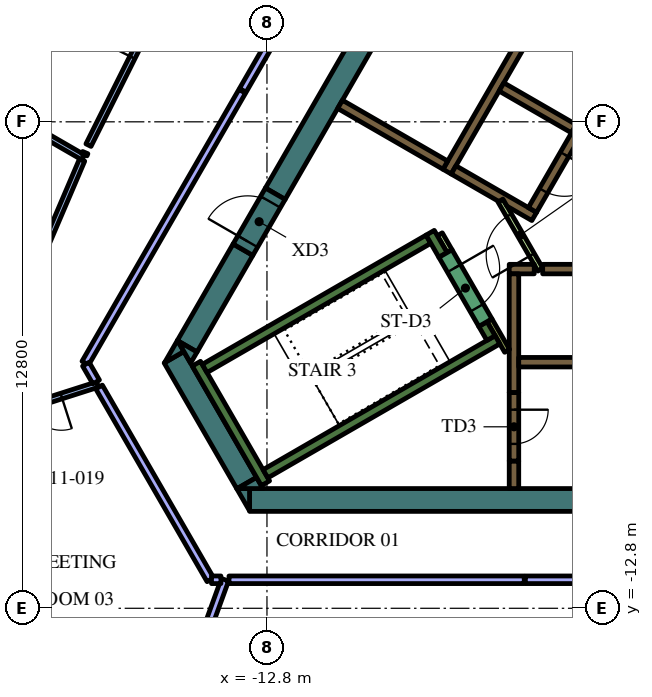
"""IFC4 building model, lengths in metres.
Left out: names, types, materials, properties, quantities, classifications, styles, units other than length and angle.
Written with IfcOpenShell. Run it as: python <this file> out.ifc"""

import sys

from ifc_helpers import new_model, si_unit, direction, frame, frame_2d, origin, place, context, subcontext, project, spatial, polyline, rectangle, outline, extrude, element, fill, save


model = new_model("IFC4")
c1 = context("Model", 3, precision=1e-05, world=origin(), true_north=direction((0.0, 1.0)))
c2 = subcontext(c1, "Body", "Model", "MODEL_VIEW")
j1 = project(units=[si_unit("LENGTHUNIT", "METRE"), si_unit("PLANEANGLEUNIT", "RADIAN")], contexts=[c1])
p1 = place(None, origin())
s1 = spatial("IfcSite", under=j1, at=p1, CompositionType="ELEMENT")
p2 = place(p1, origin())
s2 = spatial("IfcBuilding", under=s1, at=p2, CompositionType="ELEMENT")
p3 = place(p2, frame((0.0, 0.0, 267.0)))
s3 = spatial("IfcBuildingStorey", under=s2, at=p3, CompositionType="ELEMENT", Elevation=267.0)
p4 = place(p3, frame((8.904, -9.95, 0.0), z_axis=(0.0, 0.0, 1.0), x_axis=(-1.0, 0.0, 0.0)))
e1 = element("IfcWall", 1, at=p4, inside=s3, PredefinedType="SOLIDWALL", context=c2, shape_type="SweptSolid", body=[
    extrude(rectangle(XDim=22.161, YDim=0.6, at=frame_2d((11.081, 0.0))), origin(), (0.0, 0.0, 1.0), 4.2),
])
p5 = place(p3, origin())
e2 = element("IfcWall", 2, at=p5, inside=s3, PredefinedType="SOLIDWALL", context=c2, shape_type="SweptSolid", body=[
    extrude(outline(polyline([(-13.597, -9.65), (-13.259, -9.65), (-13.259, -10.236), (-13.597, -9.65)])), origin(), (0.0, 0.0, 1.0), 4.2),
])
p6 = place(p3, frame((-13.333, -9.506, 0.0), z_axis=(0.0, 0.0, 1.0), x_axis=(-0.500019073792, 0.866014391245, 0.0)))
e3 = element("IfcWall", 3, at=p6, inside=s3, PredefinedType="SOLIDWALL", context=c2, shape_type="SweptSolid", body=[
    extrude(rectangle(XDim=3.823, YDim=0.6, at=frame_2d((1.912, 0.0))), origin(), (0.0, 0.0, 1.0), 4.2),
])
e4 = element("IfcWall", 4, at=p5, inside=s3, PredefinedType="SOLIDWALL", context=c2, shape_type="SweptSolid", body=[
    extrude(outline(polyline([(-14.987, -6.043), (-15.493, -6.335), (-15.156, -5.75), (-14.987, -6.043)])), origin(), (0.0, 0.0, 1.0), 4.2),
])
e5 = element("IfcWall", 5, at=p5, inside=s3, PredefinedType="SOLIDWALL", context=c2, shape_type="SweptSolid", body=[
    extrude(outline(polyline([(-12.904, -9.65), (-13.58, -9.65), (-13.073, -9.357), (-12.904, -9.65)])), origin(), (0.0, 0.0, 1.0), 4.2),
])
p7 = place(p3, frame((-13.432, -3.364, 0.0), z_axis=(0.0, 0.0, 1.0), x_axis=(-0.499960127962, -0.866048422692, 0.0)))
e6 = element("IfcWall", 6, at=p7, inside=s3, PredefinedType="SOLIDWALL", context=c2, shape_type="SweptSolid", body=[
    extrude(rectangle(XDim=2.934, YDim=0.6, at=frame_2d((1.467, 0.0))), origin(), (0.0, 0.0, 1.0), 4.2),
])
e7 = element("IfcWall", 7, at=p5, inside=s3, PredefinedType="SOLIDWALL", context=c2, shape_type="SweptSolid", body=[
    extrude(outline(polyline([(-14.809, -6.35), (-15.147, -5.764), (-14.64, -6.057), (-14.809, -6.35)])), origin(), (0.0, 0.0, 1.0), 4.2),
])
p8 = place(p3, frame((-4.652, 11.842, 0.0), z_axis=(0.0, 0.0, 1.0), x_axis=(-0.500003640647, -0.866023301845, 0.0)))
e8 = element("IfcWall", 8, at=p8, inside=s3, PredefinedType="SOLIDWALL", context=c2, shape_type="SweptSolid", body=[
    extrude(rectangle(XDim=15.858, YDim=0.6, at=frame_2d((7.929, 0.0))), origin(), (0.0, 0.0, 1.0), 4.2),
])
p9 = place(p3, frame((-12.84, -9.511, 0.0), z_axis=(0.0, 0.0, 1.0), x_axis=(-0.499997733992, 0.866026712061, 0.0)))
e9 = element("IfcWall", 9, at=p9, inside=s3, PredefinedType="SOLIDWALL", context=c2, shape_type="SweptSolid", body=[
    extrude(rectangle(XDim=3.634, YDim=0.25, at=frame_2d((1.817, 0.0))), origin(), (0.0, 0.0, 1.0), 4.2),
])
p10 = place(p3, frame((-14.44, -6.49, 0.0), z_axis=(0.0, 0.0, 1.0), x_axis=(0.866022966069, 0.500004222222, 0.0)))
e10 = element("IfcWall", 10, at=p10, inside=s3, PredefinedType="SOLIDWALL", context=c2, shape_type="SweptSolid", body=[
    extrude(rectangle(XDim=6.8, YDim=0.25, at=frame_2d((3.4, 0.0))), origin(), (0.0, 0.0, 1.0), 4.2),
])
p11 = place(p3, frame((-8.168, -3.503, 0.0), z_axis=(0.0, 0.0, 1.0), x_axis=(-0.499952099219, 0.866053057547, 0.0)))
e11 = element("IfcWall", 11, at=p11, inside=s3, PredefinedType="SOLIDWALL", context=c2, shape_type="SweptSolid", body=[
    extrude(rectangle(XDim=0.675, YDim=0.25, at=frame_2d((0.337, 0.0))), origin(), (0.0, 0.0, 1.0), 4.2),
])
p12 = place(p3, frame((-12.84, -9.261, 0.0), z_axis=(0.0, 0.0, 1.0), x_axis=(0.866016039709, 0.500016218704, 0.0)))
e12 = element("IfcWall", 12, at=p12, inside=s3, PredefinedType="SOLIDWALL", context=c2, shape_type="SweptSolid", body=[
    extrude(rectangle(XDim=7.05, YDim=0.25, at=frame_2d((3.525, 0.0))), origin(), (0.0, 0.0, 1.0), 4.2),
])
p13 = place(p3, frame((-6.905, -5.69, 0.0), z_axis=(0.0, 0.0, 1.0), x_axis=(-0.500402024738, 0.865793170242, 0.0)))
e13 = element("IfcWall", 13, at=p13, inside=s3, PredefinedType="SOLIDWALL", context=c2, shape_type="SweptSolid", body=[
    extrude(rectangle(XDim=0.425, YDim=0.25, at=frame_2d((0.212, 0.0))), origin(), (0.0, 0.0, 1.0), 4.2),
])
p14 = place(p3, frame((-5.545, -3.875, 0.0), z_axis=(0.0, 0.0, 1.0), x_axis=(1.0, 0.0, 0.0)))
e14 = element("IfcWall", 14, at=p14, inside=s3, PredefinedType="SOLIDWALL", context=c2, shape_type="SweptSolid", body=[
    extrude(rectangle(XDim=11.97, YDim=0.25, at=frame_2d((5.985, 0.0))), origin(), (0.0, 0.0, 1.0), 4.2),
])
p15 = place(p3, frame((-6.425, -3.875, 0.0), z_axis=(0.0, 0.0, 1.0), x_axis=(1.0, 0.0, 0.0)))
e15 = element("IfcWall", 15, at=p15, inside=s3, PredefinedType="SOLIDWALL", context=c2, shape_type="SweptSolid", body=[
    extrude(rectangle(XDim=0.658, YDim=0.25, at=frame_2d((0.329, 0.0))), origin(), (0.0, 0.0, 1.0), 4.2),
])
p16 = place(p3, frame((-6.3, -7.125, 0.0), z_axis=(0.0, 0.0, 1.0), x_axis=(0.0, 1.0, 0.0)))
e16 = element("IfcWall", 16, at=p16, inside=s3, PredefinedType="SOLIDWALL", context=c2, shape_type="SweptSolid", body=[
    extrude(rectangle(XDim=3.125, YDim=0.25, at=frame_2d((1.562, 0.0))), origin(), (0.0, 0.0, 1.0), 4.2),
])
p17 = place(p3, frame((-6.3, -8.925, 0.0), z_axis=(0.0, 0.0, 1.0), x_axis=(0.0, -1.0, 0.0)))
e17 = element("IfcWall", 17, at=p17, inside=s3, PredefinedType="SOLIDWALL", context=c2, shape_type="SweptSolid", body=[
    extrude(rectangle(XDim=0.725, YDim=0.25, at=frame_2d((0.363, 0.0))), origin(), (0.0, 0.0, 1.0), 4.2),
])
p18 = place(p3, frame((-8.06, -1.311, 0.0), z_axis=(0.0, 0.0, 1.0), x_axis=(0.50000273126, 0.866023826885, 0.0)))
e18 = element("IfcWall", 18, at=p18, inside=s3, PredefinedType="SOLIDWALL", context=c2, shape_type="SweptSolid", body=[
    extrude(rectangle(XDim=10.33, YDim=0.25, at=frame_2d((5.165, 0.0))), origin(), (0.0, 0.0, 1.0), 4.2),
])
p19 = place(p3, frame((-4.724, -0.182, 0.0), z_axis=(0.0, 0.0, 1.0), x_axis=(-0.866008176907, 0.50002983664, 0.0)))
e19 = element("IfcWall", 19, at=p19, inside=s3, PredefinedType="SOLIDWALL", context=c2, shape_type="SweptSolid", body=[
    extrude(rectangle(XDim=2.2, YDim=0.25, at=frame_2d((1.1, 0.0))), origin(), (0.0, 0.0, 1.0), 4.2),
])
e20 = element("IfcWall", 20, at=p5, inside=s3, PredefinedType="SOLIDWALL", context=c2, shape_type="SweptSolid", body=[
    extrude(outline(polyline([(-5.922, -2.257), (-5.922, -2.257), (-5.705, -2.382), (-5.83, -2.598), (-6.483, -2.221), (-6.591, -2.033), (-6.591, -2.033), (-6.7, -2.096), (-7.952, -1.373), (-7.827, -1.156), (-5.922, -2.257)])), origin(), (0.0, 0.0, 1.0), 4.2),
])
p20 = place(p3, frame((-8.106, -1.14, 0.0), z_axis=(0.0, 0.0, 1.0), x_axis=(-0.866008981251, 0.500028443584, 0.0)))
e21 = element("IfcWall", 21, at=p20, inside=s3, PredefinedType="SOLIDWALL", context=c2, shape_type="SweptSolid", body=[
    extrude(rectangle(XDim=3.2, YDim=0.25, at=frame_2d((1.6, 0.0))), origin(), (0.0, 0.0, 1.0), 4.2),
])
p21 = place(p3, frame((-8.252, -2.958, 0.0), z_axis=(0.0, 0.0, 1.0), x_axis=(0.500174715838, -0.865924508047, 0.0)))
e22 = element("IfcWall", 22, at=p21, inside=s3, PredefinedType="PARTITIONING", context=c2, shape_type="SweptSolid", body=[
    extrude(rectangle(XDim=0.514, YDim=0.15, at=frame_2d((0.257, 0.0))), origin(), (0.0, 0.0, 1.0), 3.55),
])
p22 = place(p3, frame((-6.48, -6.027, 0.0), z_axis=(0.0, 0.0, 1.0), x_axis=(-0.499927229454, 0.866067413802, 0.0)))
e23 = element("IfcWall", 23, at=p22, inside=s3, PredefinedType="PARTITIONING", context=c2, shape_type="SweptSolid", body=[
    extrude(rectangle(XDim=0.929, YDim=0.15, at=frame_2d((0.464, 0.0))), origin(), (0.0, 0.0, 1.0), 4.2),
])
p23 = place(p3, frame((-6.175, -6.325, 0.0), z_axis=(0.0, 0.0, 1.0), x_axis=(1.0, 0.0, 0.0)))
e24 = element("IfcWall", 24, at=p23, inside=s3, PredefinedType="SOLIDWALL", context=c2, shape_type="SweptSolid", body=[
    extrude(rectangle(XDim=12.35, YDim=0.25, at=frame_2d((6.175, 0.0))), origin(), (0.0, 0.0, 1.0), 4.2),
])
p24 = place(p23, frame((3.205, 0.0, 0.0)))
e25 = element("IfcOpeningElement", 25, at=p24, cuts=e24, PredefinedType="OPENING", context=c2, shape_type="SweptSolid", body=[
    extrude(rectangle(XDim=0.9, YDim=2.1, at=frame_2d((0.45, 1.05))), frame((0.0, 0.135, 0.0), z_axis=(0.0, -1.0, 0.0), x_axis=(1.0, 0.0, 0.0)), (0.0, 0.0, 1.0), 0.27),
])
p25 = place(p23, frame((8.145, 0.0, 0.0)))
e26 = element("IfcOpeningElement", 26, at=p25, cuts=e24, PredefinedType="OPENING", context=c2, shape_type="SweptSolid", body=[
    extrude(rectangle(XDim=1.1, YDim=2.1, at=frame_2d((0.55, 1.05))), frame((0.0, 0.135, 0.0), z_axis=(0.0, -1.0, 0.0), x_axis=(1.0, 0.0, 0.0)), (0.0, 0.0, 1.0), 0.27),
])
p26 = place(p23, frame((10.665, 0.0, 0.0)))
e27 = element("IfcOpeningElement", 27, at=p26, cuts=e24, PredefinedType="OPENING", context=c2, shape_type="SweptSolid", body=[
    extrude(rectangle(XDim=1.1, YDim=2.1, at=frame_2d((0.55, 1.05))), frame((0.0, 0.135, 0.0), z_axis=(0.0, -1.0, 0.0), x_axis=(1.0, 0.0, 0.0)), (0.0, 0.0, 1.0), 0.27),
])
p27 = place(p3, frame((-0.898, 6.194, 0.0), z_axis=(0.0, 0.0, 1.0), x_axis=(-0.499996202215, -0.866027596426, 0.0)))
e28 = element("IfcWall", 28, at=p27, inside=s3, PredefinedType="SOLIDWALL", context=c2, shape_type="SweptSolid", body=[
    extrude(rectangle(XDim=9.83, YDim=0.25, at=frame_2d((4.915, 0.0))), origin(), (0.0, 0.0, 1.0), 4.2),
])
p28 = place(p27, frame((0.585, 0.0, 0.0)))
e29 = element("IfcOpeningElement", 29, at=p28, cuts=e28, PredefinedType="OPENING", context=c2, shape_type="SweptSolid", body=[
    extrude(rectangle(XDim=1.1, YDim=2.1, at=frame_2d((0.55, 1.05))), frame((0.0, 0.135, 0.0), z_axis=(0.0, -1.0, 0.0), x_axis=(1.0, 0.0, 0.0)), (0.0, 0.0, 1.0), 0.27),
])
p29 = place(p27, frame((3.105, 0.0, 0.0)))
e30 = element("IfcOpeningElement", 30, at=p29, cuts=e28, PredefinedType="OPENING", context=c2, shape_type="SweptSolid", body=[
    extrude(rectangle(XDim=1.1, YDim=2.1, at=frame_2d((0.55, 1.05))), frame((0.0, 0.135, 0.0), z_axis=(0.0, -1.0, 0.0), x_axis=(1.0, 0.0, 0.0)), (0.0, 0.0, 1.0), 0.27),
])
p30 = place(p27, frame((5.625, 0.0, 0.0)))
e31 = element("IfcOpeningElement", 31, at=p30, cuts=e28, PredefinedType="OPENING", context=c2, shape_type="SweptSolid", body=[
    extrude(rectangle(XDim=1.1, YDim=2.1, at=frame_2d((0.55, 1.05))), frame((0.0, 0.135, 0.0), z_axis=(0.0, -1.0, 0.0), x_axis=(1.0, 0.0, 0.0)), (0.0, 0.0, 1.0), 0.27),
])
p31 = place(p27, frame((8.145, 0.0, 0.0)))
e32 = element("IfcOpeningElement", 32, at=p31, cuts=e28, PredefinedType="OPENING", context=c2, shape_type="SweptSolid", body=[
    extrude(rectangle(XDim=1.1, YDim=2.1, at=frame_2d((0.55, 1.05))), frame((0.0, 0.135, 0.0), z_axis=(0.0, -1.0, 0.0), x_axis=(1.0, 0.0, 0.0)), (0.0, 0.0, 1.0), 0.27),
])
p32 = place(p3, frame((-8.103, -3.466, 0.0), z_axis=(0.0, 0.0, 1.0), x_axis=(0.500078061341, -0.865980330357, 0.0)))
e33 = element("IfcWall", 33, at=p32, inside=s3, PredefinedType="SOLIDWALL", context=c2, shape_type="SweptSolid", body=[
    extrude(rectangle(XDim=2.1, YDim=0.4, at=frame_2d((1.05, 0.0))), origin(), (0.0, 0.0, 1.0), 4.2),
])
p33 = place(p32, frame((0.45, 0.0, 0.0)))
e34 = element("IfcOpeningElement", 34, at=p33, cuts=e33, PredefinedType="OPENING", context=c2, shape_type="SweptSolid", body=[
    extrude(rectangle(XDim=1.2, YDim=2.1, at=frame_2d((0.6, 1.05))), frame((0.0, 0.21, 0.0), z_axis=(0.0, -1.0, 0.0), x_axis=(1.0, 0.0, 0.0)), (0.0, 0.0, 1.0), 0.42),
])
p34 = place(p3, frame((-6.3, -7.125, 0.0), z_axis=(0.0, 0.0, 1.0), x_axis=(0.0, -1.0, 0.0)))
e35 = element("IfcWall", 35, at=p34, inside=s3, PredefinedType="SOLIDWALL", context=c2, shape_type="SweptSolid", body=[
    extrude(rectangle(XDim=1.8, YDim=0.25, at=frame_2d((0.9, 0.0))), origin(), (0.0, 0.0, 1.0), 4.2),
])
p35 = place(p34, frame((0.45, 0.0, 0.0)))
e36 = element("IfcOpeningElement", 36, at=p35, cuts=e35, PredefinedType="OPENING", context=c2, shape_type="SweptSolid", body=[
    extrude(rectangle(XDim=0.9, YDim=2.1, at=frame_2d((0.45, 1.05))), frame((0.0, 0.135, 0.0), z_axis=(0.0, -1.0, 0.0), x_axis=(1.0, 0.0, 0.0)), (0.0, 0.0, 1.0), 0.27),
])
p36 = place(p3, frame((-5.606, -3.89, 0.0), z_axis=(0.0, 0.0, 1.0), x_axis=(-0.500027713859, 0.866009402589, 0.0)))
e37 = element("IfcWall", 37, at=p36, inside=s3, PredefinedType="PARTITIONING", context=c2, shape_type="SweptSolid", body=[
    extrude(rectangle(XDim=2.1, YDim=0.15, at=frame_2d((1.05, 0.0))), origin(), (0.0, 0.0, 1.0), 3.55),
])
p37 = place(p36, frame((0.45, 0.0, 0.0)))
e38 = element("IfcOpeningElement", 38, at=p37, cuts=e37, PredefinedType="OPENING", context=c2, shape_type="SweptSolid", body=[
    extrude(rectangle(XDim=1.2, YDim=2.1, at=frame_2d((0.6, 1.05))), frame((0.0, 0.085, 0.0), z_axis=(0.0, -1.0, 0.0), x_axis=(1.0, 0.0, 0.0)), (0.0, 0.0, 1.0), 0.17),
])
p38 = place(p3, frame((-13.432, -3.364, 0.0), z_axis=(0.0, 0.0, 1.0), x_axis=(0.500000056704, 0.866025371046, 0.0)))
e39 = element("IfcWall", 39, at=p38, inside=s3, PredefinedType="SOLIDWALL", context=c2, shape_type="SweptSolid", body=[
    extrude(rectangle(XDim=1.7, YDim=0.6, at=frame_2d((0.85, 0.0))), origin(), (0.0, 0.0, 1.0), 4.2),
])
p39 = place(p38, frame((0.25, 0.0, 0.0)))
e40 = element("IfcOpeningElement", 40, at=p39, cuts=e39, PredefinedType="OPENING", context=c2, shape_type="SweptSolid", body=[
    extrude(rectangle(XDim=1.2, YDim=2.1, at=frame_2d((0.6, 1.05))), frame((0.0, 0.31, 0.0), z_axis=(0.0, -1.0, 0.0), x_axis=(1.0, 0.0, 0.0)), (0.0, 0.0, 1.0), 0.62),
])
p40 = place(p3, frame((-15.774, -17.19, 0.0), z_axis=(0.0, 0.0, 1.0), x_axis=(0.341821907823, 0.93976474893, 0.0)))
e41 = element("IfcWall", 41, at=p40, inside=s3, PredefinedType="PARTITIONING", context=c2, shape_type="SweptSolid", body=[
    extrude(rectangle(XDim=5.469, YDim=0.2, at=frame_2d((2.735, 0.0))), origin(), (0.0, 0.0, 1.0), 3.55),
])
p41 = place(p3, frame((-6.0, -12.05, 0.0), z_axis=(0.0, 0.0, 1.0), x_axis=(1.0, 0.0, 0.0)))
e42 = element("IfcWall", 42, at=p41, inside=s3, PredefinedType="PARTITIONING", context=c2, shape_type="SweptSolid", body=[
    extrude(rectangle(XDim=2.712, YDim=0.2, at=frame_2d((1.356, 0.0))), origin(), (0.0, 0.0, 1.0), 3.55),
])
p42 = place(p3, frame((-13.799, -12.05, 0.0), z_axis=(0.0, 0.0, 1.0), x_axis=(1.0, 0.0, 0.0)))
e43 = element("IfcWall", 43, at=p42, inside=s3, PredefinedType="PARTITIONING", context=c2, shape_type="SweptSolid", body=[
    extrude(rectangle(XDim=7.769, YDim=0.2, at=frame_2d((3.884, 0.0))), origin(), (0.0, 0.0, 1.0), 3.55),
])
p43 = place(p3, frame((-17.635, -0.936, 0.0), z_axis=(0.0, 0.0, 1.0), x_axis=(-0.866044607523, 0.499966736674, 0.0)))
e44 = element("IfcWall", 44, at=p43, inside=s3, PredefinedType="PARTITIONING", context=c2, shape_type="SweptSolid", body=[
    extrude(rectangle(XDim=3.115, YDim=0.15, at=frame_2d((1.557, 0.0))), origin(), (0.0, 0.0, 1.0), 3.55),
])
p44 = place(p3, frame((-17.497, -0.613, 0.0), z_axis=(0.0, 0.0, 1.0), x_axis=(0.447474899467, 0.894296491297, 0.0)))
e45 = element("IfcWall", 45, at=p44, inside=s3, PredefinedType="PARTITIONING", context=c2, shape_type="SweptSolid", body=[
    extrude(rectangle(XDim=5.979, YDim=0.15, at=frame_2d((2.99, 0.0))), origin(), (0.0, 0.0, 1.0), 3.55),
])
p45 = place(p44, frame((2.58, 0.0, 0.0)))
e46 = element("IfcOpeningElement", 46, at=p45, cuts=e45, PredefinedType="OPENING", context=c2, shape_type="SweptSolid", body=[
    extrude(rectangle(XDim=0.9, YDim=2.1, at=frame_2d((0.45, 1.05))), frame((0.0, 0.085, 0.0), z_axis=(0.0, -1.0, 0.0), x_axis=(1.0, 0.0, 0.0)), (0.0, 0.0, 1.0), 0.17),
])
p46 = place(p3, frame((-17.581, -0.81, 0.0), z_axis=(0.0, 0.0, 1.0), x_axis=(-0.390033474923, -0.92080067791, 0.0)))
e47 = element("IfcWall", 47, at=p46, inside=s3, PredefinedType="PARTITIONING", context=c2, shape_type="SweptSolid", body=[
    extrude(rectangle(XDim=0.061, YDim=0.15, at=frame_2d((0.03, 0.0))), origin(), (0.0, 0.0, 1.0), 3.55),
])
p47 = place(p3, frame((-19.8, -5.998, 0.0), z_axis=(0.0, 0.0, 1.0), x_axis=(0.39332238233, 0.919400621904, 0.0)))
e48 = element("IfcWall", 48, at=p47, inside=s3, PredefinedType="PARTITIONING", context=c2, shape_type="SweptSolid", body=[
    extrude(rectangle(XDim=5.431, YDim=0.15, at=frame_2d((2.715, 0.0))), origin(), (0.0, 0.0, 1.0), 3.55),
])
p48 = place(p47, frame((2.231, 0.0, 0.0)))
e49 = element("IfcOpeningElement", 49, at=p48, cuts=e48, PredefinedType="OPENING", context=c2, shape_type="SweptSolid", body=[
    extrude(rectangle(XDim=0.9, YDim=2.1, at=frame_2d((0.45, 1.05))), frame((0.0, 0.085, 0.0), z_axis=(0.0, -1.0, 0.0), x_axis=(1.0, 0.0, 0.0)), (0.0, 0.0, 1.0), 0.17),
])
p49 = place(p3, frame((-17.256, -6.911, 0.0), z_axis=(0.0, 0.0, 1.0), x_axis=(-0.95247639241, -0.304612412587, 0.0)))
e50 = element("IfcWall", 50, at=p49, inside=s3, PredefinedType="PARTITIONING", context=c2, shape_type="SweptSolid", body=[
    extrude(rectangle(XDim=2.875, YDim=0.15, at=frame_2d((1.438, 0.0))), origin(), (0.0, 0.0, 1.0), 3.55),
])
p50 = place(p49, frame((1.0, 0.0, 0.0)))
e51 = element("IfcOpeningElement", 51, at=p50, cuts=e50, PredefinedType="OPENING", context=c2, shape_type="SweptSolid", body=[
    extrude(rectangle(XDim=0.9, YDim=2.1, at=frame_2d((0.45, 1.05))), frame((0.0, 0.085, 0.0), z_axis=(0.0, -1.0, 0.0), x_axis=(1.0, 0.0, 0.0)), (0.0, 0.0, 1.0), 0.17),
])
p51 = place(p3, frame((-7.436, 11.221, 0.0), z_axis=(0.0, 0.0, 1.0), x_axis=(-0.49999894854, -0.866026010844, 0.0)))
e52 = element("IfcWall", 52, at=p51, inside=s3, PredefinedType="PARTITIONING", context=c2, shape_type="SweptSolid", body=[
    extrude(rectangle(XDim=12.0, YDim=0.2, at=frame_2d((6.0, 0.0))), origin(), (0.0, 0.0, 1.0), 3.55),
])
p52 = place(p51, frame((5.5, 0.0, 0.0)))
e53 = element("IfcOpeningElement", 53, at=p52, cuts=e52, PredefinedType="OPENING", context=c2, shape_type="SweptSolid", body=[
    extrude(rectangle(XDim=1.0, YDim=2.1, at=frame_2d((0.5, 1.05))), frame((0.0, 0.11, 0.0), z_axis=(0.0, -1.0, 0.0), x_axis=(1.0, 0.0, 0.0)), (0.0, 0.0, 1.0), 0.22),
])
p53 = place(p3, frame((-13.451, 0.803, 0.0), z_axis=(0.0, 0.0, 1.0), x_axis=(-0.499982585408, -0.86603545787, 0.0)))
e54 = element("IfcWall", 54, at=p53, inside=s3, PredefinedType="PARTITIONING", context=c2, shape_type="SweptSolid", body=[
    extrude(rectangle(XDim=8.26, YDim=0.2, at=frame_2d((4.13, 0.0))), origin(), (0.0, 0.0, 1.0), 3.55),
])
p54 = place(p3, frame((-17.565, -6.376, 0.0), z_axis=(0.0, 0.0, 1.0), x_axis=(0.499683376352, -0.866208129376, 0.0)))
e55 = element("IfcWall", 55, at=p54, inside=s3, PredefinedType="PARTITIONING", context=c2, shape_type="SweptSolid", body=[
    extrude(rectangle(XDim=0.541, YDim=0.2, at=frame_2d((0.271, 0.0))), origin(), (0.0, 0.0, 1.0), 3.55),
])
p55 = place(p3, frame((-17.218, -6.978, 0.0), z_axis=(0.0, 0.0, 1.0), x_axis=(0.500012299885, -0.866018302326, 0.0)))
e56 = element("IfcWall", 56, at=p55, inside=s3, PredefinedType="PARTITIONING", context=c2, shape_type="SweptSolid", body=[
    extrude(rectangle(XDim=5.857, YDim=0.2, at=frame_2d((2.929, 0.0))), origin(), (0.0, 0.0, 1.0), 3.55),
])
p56 = place(p3, frame((-14.26, -12.05, 0.0), z_axis=(0.0, 0.0, 1.0), x_axis=(1.0, 0.0, 0.0)))
e57 = element("IfcWall", 57, at=p56, inside=s3, PredefinedType="PARTITIONING", context=c2, shape_type="SweptSolid", body=[
    extrude(rectangle(XDim=0.248, YDim=0.2, at=frame_2d((0.124, 0.0))), origin(), (0.0, 0.0, 1.0), 3.55),
])
p57 = place(p3, frame((-18.206, 6.227, 0.0), z_axis=(0.0, 0.0, 1.0), x_axis=(-0.447484531401, -0.894291671747, 0.0)))
e58 = element("IfcWall", 58, at=p57, inside=s3, PredefinedType="SOLIDWALL", context=c2, shape_type="SweptSolid", body=[
    extrude(rectangle(XDim=5.406, YDim=0.19, at=frame_2d((2.703, 0.0))), origin(), (0.0, 0.0, 1.0), 3.95),
])
p58 = place(p57, frame((0.346, 0.0, 0.6)))
e59 = element("IfcOpeningElement", 59, at=p58, cuts=e58, PredefinedType="OPENING", context=c2, shape_type="SweptSolid", body=[
    extrude(rectangle(XDim=1.5, YDim=2.85, at=frame_2d((0.75, 1.425))), frame((0.0, 0.105, 0.0), z_axis=(0.0, -1.0, 0.0), x_axis=(1.0, 0.0, 0.0)), (0.0, 0.0, 1.0), 0.21),
])
p59 = place(p57, frame((3.559, 0.0, 0.6)))
e60 = element("IfcOpeningElement", 60, at=p59, cuts=e58, PredefinedType="OPENING", context=c2, shape_type="SweptSolid", body=[
    extrude(rectangle(XDim=1.5, YDim=2.85, at=frame_2d((0.75, 1.425))), frame((0.0, 0.105, 0.0), z_axis=(0.0, -1.0, 0.0), x_axis=(1.0, 0.0, 0.0)), (0.0, 0.0, 1.0), 0.21),
])
p60 = place(p31, origin())
e61 = element("IfcDoor", 61, at=p60, inside=s3, OperationType="DOUBLE_DOOR_SLIDING", PredefinedType="DOOR", context=c2, shape_type="SweptSolid", body=[
    extrude(rectangle(XDim=1.1, YDim=2.1, at=frame_2d((0.55, 1.05))), frame((0.0, 0.025, 0.0), z_axis=(0.0, -1.0, 0.0), x_axis=(1.0, 0.0, 0.0)), (0.0, 0.0, 1.0), 0.05),
])
fill(e32, e61)
p61 = place(p33, origin())
e62 = element("IfcDoor", 62, at=p61, inside=s3, OperationType="SINGLE_SWING_LEFT", PredefinedType="DOOR", context=c2, shape_type="SweptSolid", body=[
    extrude(rectangle(XDim=1.2, YDim=2.1, at=frame_2d((0.6, 1.05))), frame((0.0, 0.025, 0.0), z_axis=(0.0, -1.0, 0.0), x_axis=(1.0, 0.0, 0.0)), (0.0, 0.0, 1.0), 0.05),
])
fill(e34, e62)
p62 = place(p35, origin())
e63 = element("IfcDoor", 63, at=p62, inside=s3, OperationType="SINGLE_SWING_LEFT", PredefinedType="DOOR", context=c2, shape_type="SweptSolid", body=[
    extrude(rectangle(XDim=0.9, YDim=2.1, at=frame_2d((0.45, 1.05))), frame((0.0, 0.025, 0.0), z_axis=(0.0, -1.0, 0.0), x_axis=(1.0, 0.0, 0.0)), (0.0, 0.0, 1.0), 0.05),
])
fill(e36, e63)
p63 = place(p37, origin())
e64 = element("IfcDoor", 64, at=p63, inside=s3, OperationType="SINGLE_SWING_LEFT", PredefinedType="DOOR", context=c2, shape_type="SweptSolid", body=[
    extrude(rectangle(XDim=1.2, YDim=2.1, at=frame_2d((0.6, 1.05))), frame((0.0, 0.025, 0.0), z_axis=(0.0, -1.0, 0.0), x_axis=(1.0, 0.0, 0.0)), (0.0, 0.0, 1.0), 0.05),
])
fill(e38, e64)
p64 = place(p39, origin())
e65 = element("IfcDoor", 65, at=p64, inside=s3, OperationType="SINGLE_SWING_LEFT", PredefinedType="DOOR", context=c2, shape_type="SweptSolid", body=[
    extrude(rectangle(XDim=1.2, YDim=2.1, at=frame_2d((0.6, 1.05))), frame((0.0, 0.025, 0.0), z_axis=(0.0, -1.0, 0.0), x_axis=(1.0, 0.0, 0.0)), (0.0, 0.0, 1.0), 0.05),
])
fill(e40, e65)
p65 = place(p45, origin())
e66 = element("IfcDoor", 66, at=p65, inside=s3, OperationType="SINGLE_SWING_RIGHT", PredefinedType="DOOR", context=c2, shape_type="SweptSolid", body=[
    extrude(rectangle(XDim=0.9, YDim=2.1, at=frame_2d((0.45, 1.05))), frame((0.0, 0.025, 0.0), z_axis=(0.0, -1.0, 0.0), x_axis=(1.0, 0.0, 0.0)), (0.0, 0.0, 1.0), 0.05),
])
fill(e46, e66)
p66 = place(p50, origin())
e67 = element("IfcDoor", 67, at=p66, inside=s3, OperationType="SINGLE_SWING_RIGHT", PredefinedType="DOOR", context=c2, shape_type="SweptSolid", body=[
    extrude(rectangle(XDim=0.9, YDim=2.1, at=frame_2d((0.45, 1.05))), frame((0.0, 0.025, 0.0), z_axis=(0.0, -1.0, 0.0), x_axis=(1.0, 0.0, 0.0)), (0.0, 0.0, 1.0), 0.05),
])
fill(e51, e67)
save(model, sys.argv[1])
